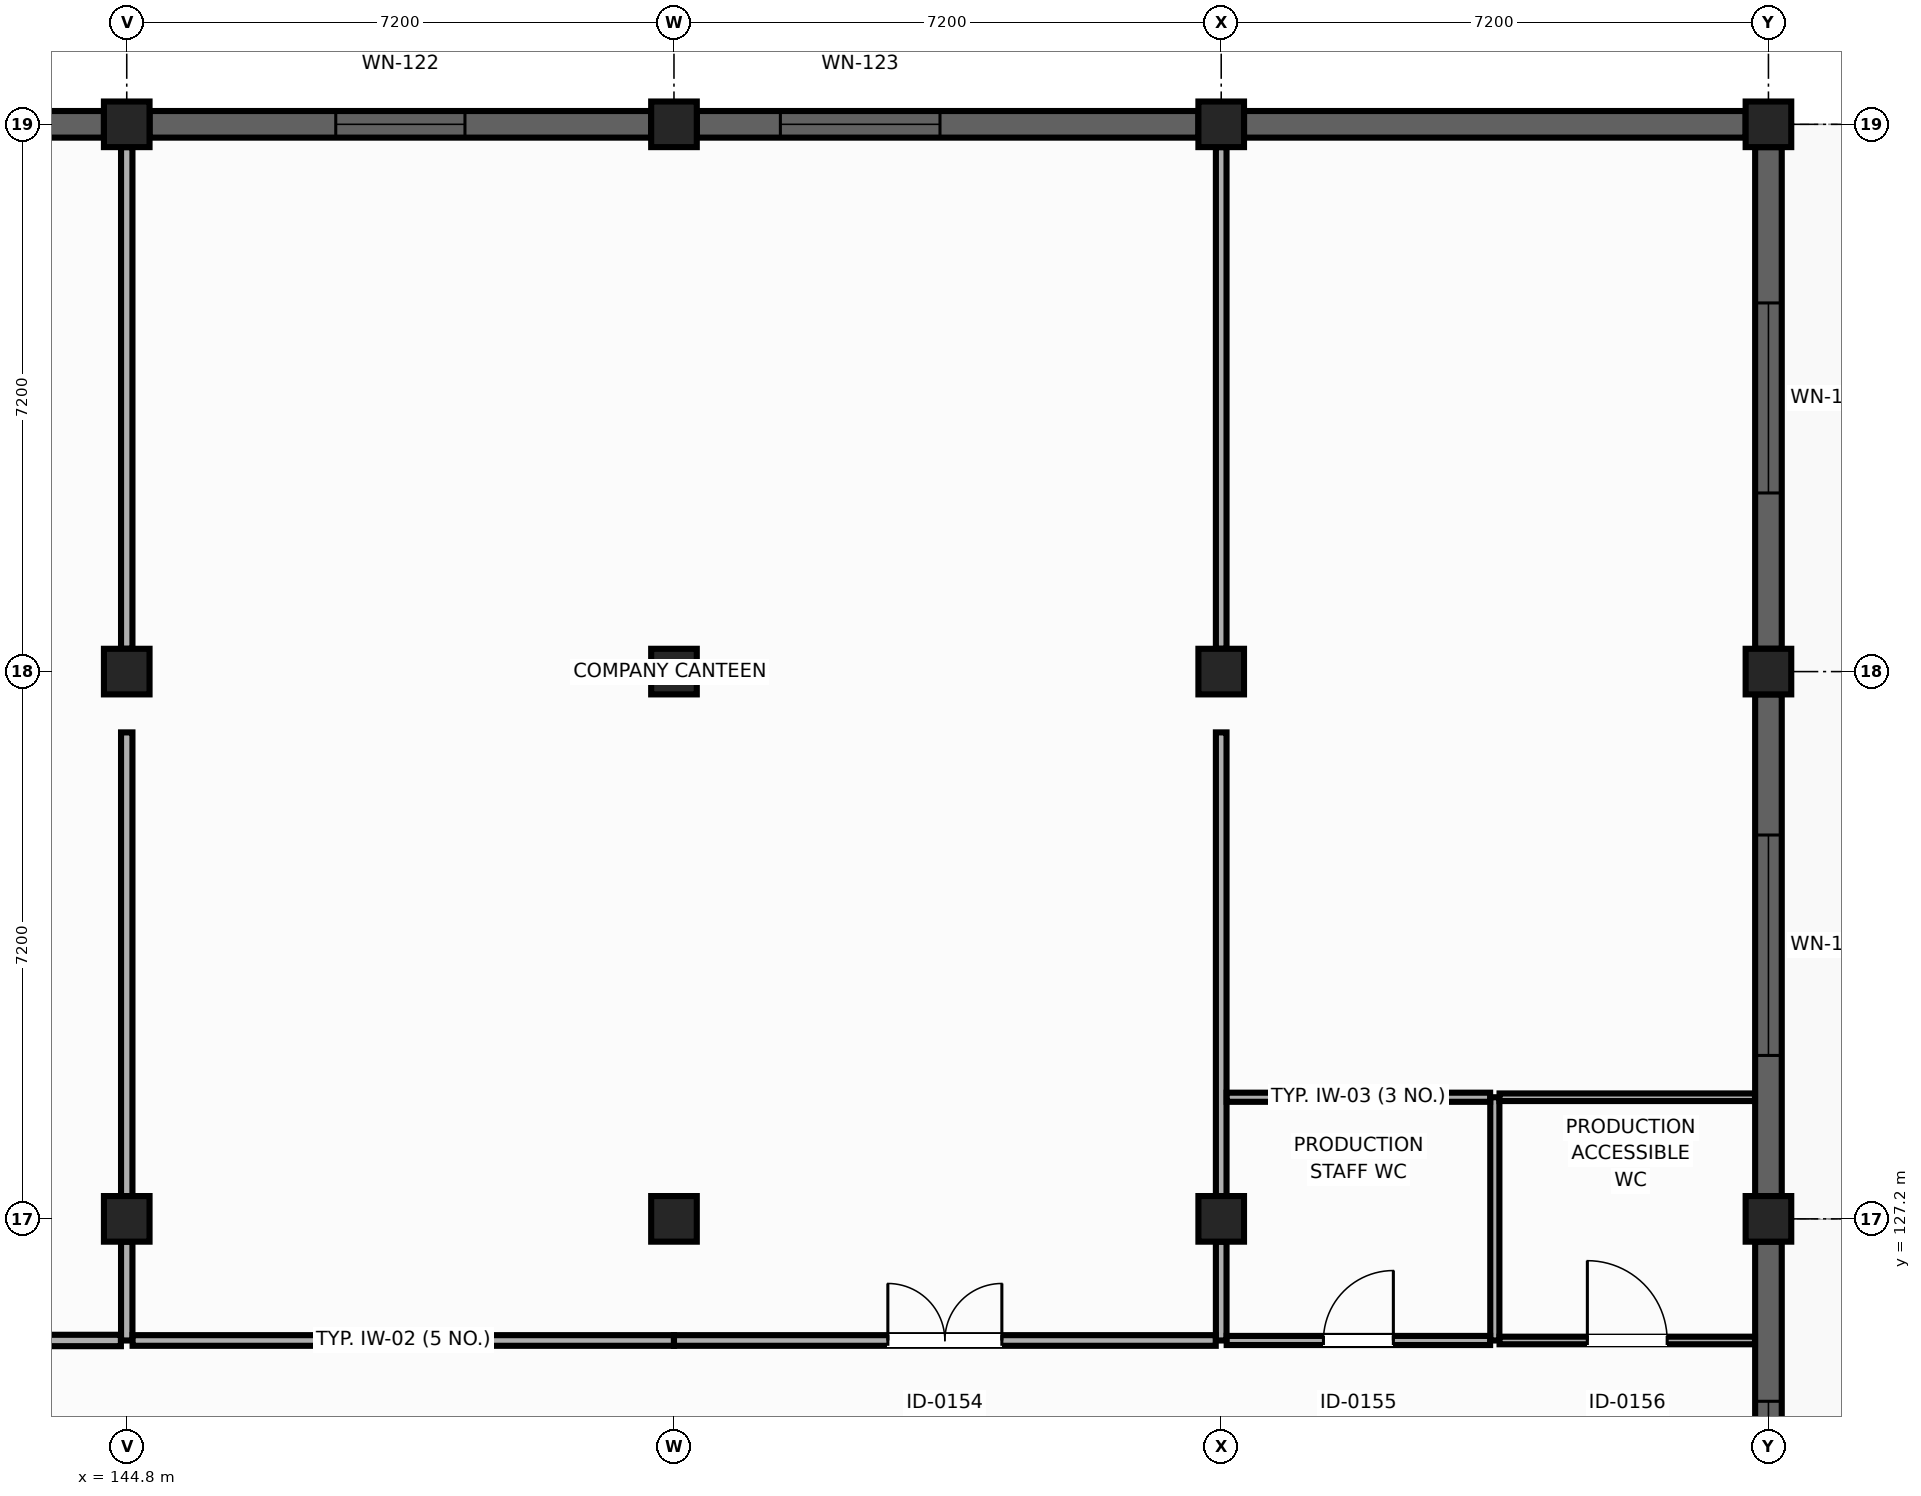
"""IFC4 building model, lengths in metres.
Left out: names, types, materials, properties, quantities, classifications, styles, units other than length and angle.
Written with IfcOpenShell. Run it as: python <this file> out.ifc"""

import sys

from ifc_helpers import new_model, si_unit, direction, frame, frame_2d, origin, origin_2d, place, context, subcontext, project, spatial, rectangle, extrude, element, fill, save


model = new_model("IFC4")
c1 = context("Model", 3, precision=1e-05, world=origin(), true_north=direction((0.0, 1.0)))
c2 = subcontext(c1, "Body", "Model", "MODEL_VIEW")
j1 = project(units=[si_unit("LENGTHUNIT", "METRE"), si_unit("PLANEANGLEUNIT", "RADIAN")], contexts=[c1])
p1 = place(None, origin())
s1 = spatial("IfcSite", under=j1, at=p1, CompositionType="ELEMENT")
p2 = place(p1, origin())
s2 = spatial("IfcBuilding", under=s1, at=p2, CompositionType="ELEMENT")
p3 = place(p2, frame((0.0, 0.0, 18.9)))
s3 = spatial("IfcBuildingStorey", under=s2, at=p3, CompositionType="ELEMENT", Elevation=18.9)
for number, where, z_axis, x_axis in (
    (1, (144.8, 127.2, 0.0), (0.0, 0.0, 1.0), (1.0, 0.0, 0.0)),
    (2, (152.0, 127.2, 0.0), (0.0, 0.0, 1.0), (0.0, 1.0, 0.0)),
    (3, (159.2, 127.2, 0.0), (0.0, 0.0, 1.0), (1.0, 0.0, 0.0)),
    (4, (166.4, 127.2, 0.0), (0.0, 0.0, 1.0), (0.0, 1.0, 0.0)),
):
    element("IfcColumn", number, at=place(p3, frame(where, z_axis=z_axis, x_axis=x_axis)), inside=s3, PredefinedType="COLUMN", context=c2, shape_type="SweptSolid", body=[
        extrude(rectangle(XDim=0.6, YDim=0.6, at=origin_2d()), origin(), (0.0, 0.0, 1.0), 6.997),
    ])
for number, where, z_axis, x_axis in (
    (5, (144.8, 134.4, 0.0), (0.0, 0.0, 1.0), (0.0, 1.0, 0.0)),
    (6, (152.0, 134.4, 0.0), (0.0, 0.0, 1.0), (1.0, 0.0, 0.0)),
    (7, (159.2, 134.4, 0.0), (0.0, 0.0, 1.0), (0.0, 1.0, 0.0)),
    (8, (166.4, 134.4, 0.0), (0.0, 0.0, 1.0), (1.0, 0.0, 0.0)),
):
    element("IfcColumn", number, at=place(p3, frame(where, z_axis=z_axis, x_axis=x_axis)), inside=s3, PredefinedType="COLUMN", context=c2, shape_type="SweptSolid", body=[
        extrude(rectangle(XDim=0.6, YDim=0.6, at=origin_2d()), origin(), (0.0, 0.0, 1.0), 5.521),
    ])
for number, where, z_axis, x_axis in (
    (9, (144.8, 141.6, 0.0), (0.0, 0.0, 1.0), (1.0, 0.0, 0.0)),
    (10, (152.0, 141.6, 0.0), (0.0, 0.0, 1.0), (0.0, 1.0, 0.0)),
    (11, (159.2, 141.6, 0.0), (0.0, 0.0, 1.0), (1.0, 0.0, 0.0)),
    (12, (166.4, 141.6, 0.0), (0.0, 0.0, 1.0), (1.0, 0.0, 0.0)),
):
    element("IfcColumn", number, at=place(p3, frame(where, z_axis=z_axis, x_axis=x_axis)), inside=s3, PredefinedType="COLUMN", context=c2, shape_type="SweptSolid", body=[
        extrude(rectangle(XDim=0.6, YDim=0.6, at=origin_2d()), origin(), (0.0, 0.0, 1.0), 4.046),
    ])
p4 = place(p3, frame((137.9, 141.6, 0.0), z_axis=(0.0, 0.0, 1.0), x_axis=(1.0, 0.0, 0.0)))
e13 = element("IfcWall", 13, at=p4, inside=s3, PredefinedType="SOLIDWALL", context=c2, shape_type="SweptSolid", body=[
    extrude(rectangle(XDim=6.6, YDim=0.35, at=frame_2d((3.3, 0.0))), origin(), (0.0, 0.0, 1.0), 4.046),
])
p5 = place(p4, frame((2.65, 0.0, 0.9)))
e14 = element("IfcOpeningElement", 14, at=p5, cuts=e13, PredefinedType="OPENING", context=c2, shape_type="SweptSolid", body=[
    extrude(rectangle(XDim=1.3, YDim=1.6, at=frame_2d((0.65, 0.8))), frame((0.0, 0.185, 0.0), z_axis=(0.0, -1.0, 0.0), x_axis=(1.0, 0.0, 0.0)), (0.0, 0.0, 1.0), 0.37),
])
p6 = place(p3, frame((145.1, 141.6, 0.0), z_axis=(0.0, 0.0, 1.0), x_axis=(1.0, 0.0, 0.0)))
e15 = element("IfcWall", 15, at=p6, inside=s3, PredefinedType="SOLIDWALL", context=c2, shape_type="SweptSolid", body=[
    extrude(rectangle(XDim=6.6, YDim=0.35, at=frame_2d((3.3, 0.0))), origin(), (0.0, 0.0, 1.0), 4.046),
])
p7 = place(p6, frame((2.45, 0.0, 0.9)))
e16 = element("IfcOpeningElement", 16, at=p7, cuts=e15, PredefinedType="OPENING", context=c2, shape_type="SweptSolid", body=[
    extrude(rectangle(XDim=1.7, YDim=1.6, at=frame_2d((0.85, 0.8))), frame((0.0, 0.185, 0.0), z_axis=(0.0, -1.0, 0.0), x_axis=(1.0, 0.0, 0.0)), (0.0, 0.0, 1.0), 0.37),
])
p8 = place(p3, frame((152.3, 141.6, 0.0), z_axis=(0.0, 0.0, 1.0), x_axis=(1.0, 0.0, 0.0)))
e17 = element("IfcWall", 17, at=p8, inside=s3, PredefinedType="SOLIDWALL", context=c2, shape_type="SweptSolid", body=[
    extrude(rectangle(XDim=6.6, YDim=0.35, at=frame_2d((3.3, 0.0))), origin(), (0.0, 0.0, 1.0), 4.046),
])
p9 = place(p8, frame((1.1, 0.0, 0.9)))
e18 = element("IfcOpeningElement", 18, at=p9, cuts=e17, PredefinedType="OPENING", context=c2, shape_type="SweptSolid", body=[
    extrude(rectangle(XDim=2.1, YDim=1.6, at=frame_2d((1.05, 0.8))), frame((0.0, 0.185, 0.0), z_axis=(0.0, -1.0, 0.0), x_axis=(1.0, 0.0, 0.0)), (0.0, 0.0, 1.0), 0.37),
])
p10 = place(p3, frame((159.5, 141.6, 0.0), z_axis=(0.0, 0.0, 1.0), x_axis=(1.0, 0.0, 0.0)))
e19 = element("IfcWall", 19, at=p10, inside=s3, PredefinedType="SOLIDWALL", context=c2, shape_type="SweptSolid", body=[
    extrude(rectangle(XDim=6.6, YDim=0.35, at=frame_2d((3.3, 0.0))), origin(), (0.0, 0.0, 1.0), 4.046),
])
p11 = place(p3, frame((166.4, 141.3, 0.0), z_axis=(0.0, 0.0, 1.0), x_axis=(0.0, -1.0, 0.0)))
e20 = element("IfcWall", 20, at=p11, inside=s3, PredefinedType="SOLIDWALL", context=c2, shape_type="SweptSolid", body=[
    extrude(rectangle(XDim=6.6, YDim=0.35, at=frame_2d((3.3, 0.0))), origin(), (0.0, 0.0, 1.0), 4.2),
])
p12 = place(p11, frame((2.05, 0.0, 0.9)))
e21 = element("IfcOpeningElement", 21, at=p12, cuts=e20, PredefinedType="OPENING", context=c2, shape_type="SweptSolid", body=[
    extrude(rectangle(XDim=2.5, YDim=1.6, at=frame_2d((1.25, 0.8))), frame((0.0, 0.185, 0.0), z_axis=(0.0, -1.0, 0.0), x_axis=(1.0, 0.0, 0.0)), (0.0, 0.0, 1.0), 0.37),
])
p13 = place(p3, frame((166.4, 134.1, 0.0), z_axis=(0.0, 0.0, 1.0), x_axis=(0.0, -1.0, 0.0)))
e22 = element("IfcWall", 22, at=p13, inside=s3, PredefinedType="SOLIDWALL", context=c2, shape_type="SweptSolid", body=[
    extrude(rectangle(XDim=6.6, YDim=0.35, at=frame_2d((3.3, 0.0))), origin(), (0.0, 0.0, 1.0), 4.2),
])
p14 = place(p13, frame((1.85, 0.0, 0.9)))
e23 = element("IfcOpeningElement", 23, at=p14, cuts=e22, PredefinedType="OPENING", context=c2, shape_type="SweptSolid", body=[
    extrude(rectangle(XDim=2.9, YDim=1.6, at=frame_2d((1.45, 0.8))), frame((0.0, 0.185, 0.0), z_axis=(0.0, -1.0, 0.0), x_axis=(1.0, 0.0, 0.0)), (0.0, 0.0, 1.0), 0.37),
])
p15 = place(p3, frame((166.4, 126.9, 0.0), z_axis=(0.0, 0.0, 1.0), x_axis=(0.0, -1.0, 0.0)))
e24 = element("IfcWall", 24, at=p15, inside=s3, PredefinedType="SOLIDWALL", context=c2, shape_type="SweptSolid", body=[
    extrude(rectangle(XDim=6.6, YDim=0.35, at=frame_2d((3.3, 0.0))), origin(), (0.0, 0.0, 1.0), 4.2),
])
p16 = place(p15, frame((2.1, 0.0, 0.9)))
e25 = element("IfcOpeningElement", 25, at=p16, cuts=e24, PredefinedType="OPENING", context=c2, shape_type="SweptSolid", body=[
    extrude(rectangle(XDim=1.2, YDim=1.8, at=frame_2d((0.6, 0.9))), frame((0.0, 0.185, 0.0), z_axis=(0.0, -1.0, 0.0), x_axis=(1.0, 0.0, 0.0)), (0.0, 0.0, 1.0), 0.37),
])
p17 = place(p3, frame((144.8, 127.5, 0.0), z_axis=(0.0, 0.0, 1.0), x_axis=(0.0, 1.0, 0.0)))
e26 = element("IfcWall", 26, at=p17, inside=s3, PredefinedType="PARTITIONING", context=c2, shape_type="SweptSolid", body=[
    extrude(rectangle(XDim=6.1, YDim=0.15, at=frame_2d((3.05, 0.0))), origin(), (0.0, 0.0, 1.0), 6.31),
])
p18 = place(p3, frame((144.8, 125.6, 0.0), z_axis=(0.0, 0.0, 1.0), x_axis=(0.0, 1.0, 0.0)))
e27 = element("IfcWall", 27, at=p18, inside=s3, PredefinedType="PARTITIONING", context=c2, shape_type="SweptSolid", body=[
    extrude(rectangle(XDim=1.3, YDim=0.15, at=frame_2d((0.65, 0.0))), origin(), (0.0, 0.0, 1.0), 6.802),
])
p19 = place(p3, frame((144.8, 134.7, 0.0), z_axis=(0.0, 0.0, 1.0), x_axis=(0.0, 1.0, 0.0)))
e28 = element("IfcWall", 28, at=p19, inside=s3, PredefinedType="PARTITIONING", context=c2, shape_type="SweptSolid", body=[
    extrude(rectangle(XDim=6.6, YDim=0.15, at=frame_2d((3.3, 0.0))), origin(), (0.0, 0.0, 1.0), 4.784),
])
p20 = place(p3, frame((137.6, 125.6, 0.0), z_axis=(0.0, 0.0, 1.0), x_axis=(1.0, 0.0, 0.0)))
e29 = element("IfcWall", 29, at=p20, inside=s3, PredefinedType="PARTITIONING", context=c2, shape_type="SweptSolid", body=[
    extrude(rectangle(XDim=7.123, YDim=0.15, at=frame_2d((3.562, 0.0))), origin(), (0.0, 0.0, 1.0), 3.245),
])
p21 = place(p3, frame((159.2, 127.5, 0.0), z_axis=(0.0, 0.0, 1.0), x_axis=(0.0, 1.0, 0.0)))
e30 = element("IfcWall", 30, at=p21, inside=s3, PredefinedType="PARTITIONING", context=c2, shape_type="SweptSolid", body=[
    extrude(rectangle(XDim=6.1, YDim=0.14, at=frame_2d((3.05, 0.0))), origin(), (0.0, 0.0, 1.0), 6.31),
])
p22 = place(p3, frame((159.2, 125.6, 0.0), z_axis=(0.0, 0.0, 1.0), x_axis=(0.0, 1.0, 0.0)))
e31 = element("IfcWall", 31, at=p22, inside=s3, PredefinedType="PARTITIONING", context=c2, shape_type="SweptSolid", body=[
    extrude(rectangle(XDim=1.3, YDim=0.14, at=frame_2d((0.65, 0.0))), origin(), (0.0, 0.0, 1.0), 6.802),
])
p23 = place(p3, frame((159.2, 134.7, 0.0), z_axis=(0.0, 0.0, 1.0), x_axis=(0.0, 1.0, 0.0)))
e32 = element("IfcWall", 32, at=p23, inside=s3, PredefinedType="PARTITIONING", context=c2, shape_type="SweptSolid", body=[
    extrude(rectangle(XDim=6.6, YDim=0.14, at=frame_2d((3.3, 0.0))), origin(), (0.0, 0.0, 1.0), 4.784),
])
p24 = place(p3, frame((144.877, 125.6, 0.0), z_axis=(0.0, 0.0, 1.0), x_axis=(1.0, 0.0, 0.0)))
e33 = element("IfcWall", 33, at=p24, inside=s3, PredefinedType="PARTITIONING", context=c2, shape_type="SweptSolid", body=[
    extrude(rectangle(XDim=7.123, YDim=0.14, at=frame_2d((3.562, 0.0))), origin(), (0.0, 0.0, 1.0), 6.669),
])
p25 = place(p3, frame((152.0, 125.6, 0.0), z_axis=(0.0, 0.0, 1.0), x_axis=(1.0, 0.0, 0.0)))
e34 = element("IfcWall", 34, at=p25, inside=s3, PredefinedType="PARTITIONING", context=c2, shape_type="SweptSolid", body=[
    extrude(rectangle(XDim=7.128, YDim=0.14, at=frame_2d((3.564, 0.0))), origin(), (0.0, 0.0, 1.0), 6.669),
])
p26 = place(p25, frame((2.814, 0.0, 0.0)))
e35 = element("IfcOpeningElement", 35, at=p26, cuts=e34, PredefinedType="OPENING", context=c2, shape_type="SweptSolid", body=[
    extrude(rectangle(XDim=1.5, YDim=2.2, at=frame_2d((0.75, 1.1))), frame((0.0, 0.08, 0.0), z_axis=(0.0, -1.0, 0.0), x_axis=(1.0, 0.0, 0.0)), (0.0, 0.0, 1.0), 0.16),
])
p27 = place(p3, frame((162.8, 125.6, 0.0), z_axis=(0.0, 0.0, 1.0), x_axis=(0.0, 1.0, 0.0)))
e36 = element("IfcWall", 36, at=p27, inside=s3, PredefinedType="PARTITIONING", context=c2, shape_type="SweptSolid", body=[
    extrude(rectangle(XDim=3.2, YDim=0.12, at=frame_2d((1.6, 0.0))), origin(), (0.0, 0.0, 1.0), 6.997),
])
p28 = place(p3, frame((162.738, 128.8, 0.0), z_axis=(0.0, 0.0, 1.0), x_axis=(-1.0, 0.0, 0.0)))
e37 = element("IfcWall", 37, at=p28, inside=s3, PredefinedType="PARTITIONING", context=c2, shape_type="SweptSolid", body=[
    extrude(rectangle(XDim=3.466, YDim=0.12, at=frame_2d((1.733, 0.0))), origin(), (0.0, 0.0, 1.0), 6.669),
])
p29 = place(p3, frame((159.272, 125.6, 0.0), z_axis=(0.0, 0.0, 1.0), x_axis=(1.0, 0.0, 0.0)))
e38 = element("IfcWall", 38, at=p29, inside=s3, PredefinedType="PARTITIONING", context=c2, shape_type="SweptSolid", body=[
    extrude(rectangle(XDim=3.466, YDim=0.12, at=frame_2d((1.733, 0.0))), origin(), (0.0, 0.0, 1.0), 6.669),
])
p30 = place(p29, frame((1.273, 0.0, 0.0)))
e39 = element("IfcOpeningElement", 39, at=p30, cuts=e38, PredefinedType="OPENING", context=c2, shape_type="SweptSolid", body=[
    extrude(rectangle(XDim=0.92, YDim=2.1, at=frame_2d((0.46, 1.05))), frame((0.0, 0.07, 0.0), z_axis=(0.0, -1.0, 0.0), x_axis=(1.0, 0.0, 0.0)), (0.0, 0.0, 1.0), 0.14),
])
p31 = place(p3, frame((166.223, 128.8, 0.0), z_axis=(0.0, 0.0, 1.0), x_axis=(-1.0, 0.0, 0.0)))
e40 = element("IfcWall", 40, at=p31, inside=s3, PredefinedType="PARTITIONING", context=c2, shape_type="SweptSolid", body=[
    extrude(rectangle(XDim=3.361, YDim=0.1, at=frame_2d((1.68, 0.0))), origin(), (0.0, 0.0, 1.0), 6.669),
])
p32 = place(p3, frame((162.862, 125.6, 0.0), z_axis=(0.0, 0.0, 1.0), x_axis=(1.0, 0.0, 0.0)))
e41 = element("IfcWall", 41, at=p32, inside=s3, PredefinedType="PARTITIONING", context=c2, shape_type="SweptSolid", body=[
    extrude(rectangle(XDim=3.361, YDim=0.1, at=frame_2d((1.68, 0.0))), origin(), (0.0, 0.0, 1.0), 6.669),
])
p33 = place(p32, frame((1.156, 0.0, 0.0)))
e42 = element("IfcOpeningElement", 42, at=p33, cuts=e41, PredefinedType="OPENING", context=c2, shape_type="SweptSolid", body=[
    extrude(rectangle(XDim=1.05, YDim=2.12, at=frame_2d((0.525, 1.06))), frame((0.0, 0.06, 0.0), z_axis=(0.0, -1.0, 0.0), x_axis=(1.0, 0.0, 0.0)), (0.0, 0.0, 1.0), 0.12),
])
p34 = place(p7, origin())
e43 = element("IfcWindow", 43, at=p34, inside=s3, PartitioningType="SINGLE_PANEL", PredefinedType="WINDOW", context=c2, shape_type="SweptSolid", body=[
    extrude(rectangle(XDim=1.7, YDim=1.6, at=frame_2d((0.85, 0.8))), frame((0.0, 0.03, 0.0), z_axis=(0.0, -1.0, 0.0), x_axis=(1.0, 0.0, 0.0)), (0.0, 0.0, 1.0), 0.06),
])
fill(e16, e43)
p35 = place(p9, origin())
e44 = element("IfcWindow", 44, at=p35, inside=s3, PartitioningType="SINGLE_PANEL", PredefinedType="WINDOW", context=c2, shape_type="SweptSolid", body=[
    extrude(rectangle(XDim=2.1, YDim=1.6, at=frame_2d((1.05, 0.8))), frame((0.0, 0.03, 0.0), z_axis=(0.0, -1.0, 0.0), x_axis=(1.0, 0.0, 0.0)), (0.0, 0.0, 1.0), 0.06),
])
fill(e18, e44)
p36 = place(p12, origin())
e45 = element("IfcWindow", 45, at=p36, inside=s3, PartitioningType="SINGLE_PANEL", PredefinedType="WINDOW", context=c2, shape_type="SweptSolid", body=[
    extrude(rectangle(XDim=2.5, YDim=1.6, at=frame_2d((1.25, 0.8))), frame((0.0, 0.03, 0.0), z_axis=(0.0, -1.0, 0.0), x_axis=(1.0, 0.0, 0.0)), (0.0, 0.0, 1.0), 0.06),
])
fill(e21, e45)
p37 = place(p14, origin())
e46 = element("IfcWindow", 46, at=p37, inside=s3, PartitioningType="SINGLE_PANEL", PredefinedType="WINDOW", context=c2, shape_type="SweptSolid", body=[
    extrude(rectangle(XDim=2.9, YDim=1.6, at=frame_2d((1.45, 0.8))), frame((0.0, 0.03, 0.0), z_axis=(0.0, -1.0, 0.0), x_axis=(1.0, 0.0, 0.0)), (0.0, 0.0, 1.0), 0.06),
])
fill(e23, e46)
p38 = place(p16, origin())
e47 = element("IfcWindow", 47, at=p38, inside=s3, PartitioningType="SINGLE_PANEL", PredefinedType="WINDOW", context=c2, shape_type="SweptSolid", body=[
    extrude(rectangle(XDim=1.2, YDim=1.8, at=frame_2d((0.6, 0.9))), frame((0.0, 0.03, 0.0), z_axis=(0.0, -1.0, 0.0), x_axis=(1.0, 0.0, 0.0)), (0.0, 0.0, 1.0), 0.06),
])
fill(e25, e47)
p39 = place(p26, origin())
e48 = element("IfcDoor", 48, at=p39, inside=s3, OperationType="DOUBLE_DOOR_SINGLE_SWING", PredefinedType="DOOR", context=c2, shape_type="SweptSolid", body=[
    extrude(rectangle(XDim=1.5, YDim=2.2, at=frame_2d((0.75, 1.1))), frame((0.0, 0.025, 0.0), z_axis=(0.0, -1.0, 0.0), x_axis=(1.0, 0.0, 0.0)), (0.0, 0.0, 1.0), 0.05),
])
fill(e35, e48)
p40 = place(p30, origin())
e49 = element("IfcDoor", 49, at=p40, inside=s3, OperationType="SINGLE_SWING_RIGHT", PredefinedType="DOOR", context=c2, shape_type="SweptSolid", body=[
    extrude(rectangle(XDim=0.92, YDim=2.1, at=frame_2d((0.46, 1.05))), frame((0.0, 0.025, 0.0), z_axis=(0.0, -1.0, 0.0), x_axis=(1.0, 0.0, 0.0)), (0.0, 0.0, 1.0), 0.05),
])
fill(e39, e49)
p41 = place(p33, origin())
e50 = element("IfcDoor", 50, at=p41, inside=s3, OperationType="SINGLE_SWING_LEFT", PredefinedType="DOOR", context=c2, shape_type="SweptSolid", body=[
    extrude(rectangle(XDim=1.05, YDim=2.12, at=frame_2d((0.525, 1.06))), frame((0.0, 0.025, 0.0), z_axis=(0.0, -1.0, 0.0), x_axis=(1.0, 0.0, 0.0)), (0.0, 0.0, 1.0), 0.05),
])
fill(e42, e50)
save(model, sys.argv[1])
